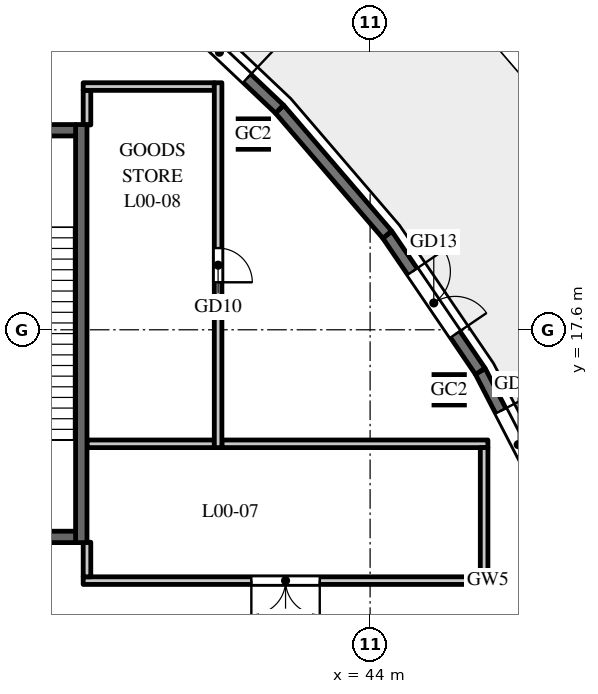
"""IFC4 building model, lengths in metres.
Left out: names, types, materials, properties, quantities, classifications, styles, units other than length and angle.
Written with IfcOpenShell. Run it as: python <this file> out.ifc"""

import sys

from ifc_helpers import new_model, si_unit, direction, frame, frame_2d, origin, origin_2d, place, context, subcontext, project, spatial, rectangle, hollow_rectangle, extrude, element, fill, save


model = new_model("IFC4")
c1 = context("Model", 3, precision=1e-05, world=origin(), true_north=direction((0.0, 1.0)))
c2 = subcontext(c1, "Body", "Model", "MODEL_VIEW")
j1 = project(units=[si_unit("LENGTHUNIT", "METRE"), si_unit("PLANEANGLEUNIT", "RADIAN")], contexts=[c1])
p1 = place(None, origin())
s1 = spatial("IfcSite", under=j1, at=p1, CompositionType="ELEMENT")
p2 = place(p1, origin())
s2 = spatial("IfcBuilding", under=s1, at=p2, CompositionType="ELEMENT")
p3 = place(p2, origin())
s3 = spatial("IfcBuildingStorey", under=s2, at=p3, CompositionType="ELEMENT", Elevation=0.0)
for number, where, z_axis, x_axis in (
    (1, (46.081, 16.021, 0.0), (0.0, 0.0, 1.0), (1.0, 0.0, 0.0)),
    (2, (40.928, 22.75, 0.0), (0.0, 0.0, 1.0), (1.0, 0.0, 0.0)),
):
    element("IfcColumn", number, at=place(p3, frame(where, z_axis=z_axis, x_axis=x_axis)), inside=s3, PredefinedType="COLUMN", context=c2, shape_type="SweptSolid", body=[
        extrude(hollow_rectangle(XDim=0.8, YDim=0.8, WallThickness=0.04, at=origin_2d()), origin(), (0.0, 0.0, 1.0), 7.5),
    ])
p4 = place(p3, frame((36.55, 14.6, 0.0), z_axis=(0.0, 0.0, 1.0), x_axis=(1.0, 0.0, 0.0)))
e3 = element("IfcWall", 3, at=p4, inside=s3, PredefinedType="PARTITIONING", context=c2, shape_type="SweptSolid", body=[
    extrude(rectangle(XDim=3.351, YDim=0.2, at=frame_2d((1.675, 0.0))), origin(), (0.0, 0.0, 1.0), 7.25),
])
p5 = place(p3, frame((47.1, 11.0, 0.0), z_axis=(0.0, 0.0, 1.0), x_axis=(-1.0, 0.0, 0.0)))
e4 = element("IfcWall", 4, at=p5, inside=s3, PredefinedType="PARTITIONING", context=c2, shape_type="SweptSolid", body=[
    extrude(rectangle(XDim=10.65, YDim=0.2, at=frame_2d((5.325, 0.0))), origin(), (0.0, 0.0, 1.0), 7.25),
])
p6 = place(p5, frame((4.425, 0.0, 0.0)))
e5 = element("IfcOpeningElement", 5, at=p6, cuts=e4, PredefinedType="OPENING", context=c2, shape_type="SweptSolid", body=[
    extrude(rectangle(XDim=1.8, YDim=2.4, at=frame_2d((0.9, 1.2))), frame((0.0, 0.11, 0.0), z_axis=(0.0, -1.0, 0.0), x_axis=(1.0, 0.0, 0.0)), (0.0, 0.0, 1.0), 0.22),
])
p7 = place(p3, frame((36.55, 11.1, 0.0), z_axis=(0.0, 0.0, 1.0), x_axis=(0.0, 1.0, 0.0)))
e6 = element("IfcWall", 6, at=p7, inside=s3, PredefinedType="PARTITIONING", context=c2, shape_type="SweptSolid", body=[
    extrude(rectangle(XDim=0.91, YDim=0.2, at=frame_2d((0.455, 0.0))), origin(), (0.0, 0.0, 1.0), 7.25),
])
p8 = place(p3, frame((40.099, 14.6, 0.0), z_axis=(0.0, 0.0, 1.0), x_axis=(1.0, 0.0, 0.0)))
e7 = element("IfcWall", 7, at=p8, inside=s3, PredefinedType="PARTITIONING", context=c2, shape_type="SweptSolid", body=[
    extrude(rectangle(XDim=7.001, YDim=0.2, at=frame_2d((3.5, 0.0))), origin(), (0.0, 0.0, 1.0), 6.65),
])
p9 = place(p3, frame((47.0, 14.5, 0.0), z_axis=(0.0, 0.0, 1.0), x_axis=(0.0, -1.0, 0.0)))
e8 = element("IfcWall", 8, at=p9, inside=s3, PredefinedType="PARTITIONING", context=c2, shape_type="SweptSolid", body=[
    extrude(rectangle(XDim=3.4, YDim=0.2, at=frame_2d((1.7, 0.0))), origin(), (0.0, 0.0, 1.0), 6.65),
])
p10 = place(p3, frame((36.55, 22.99, 0.0), z_axis=(0.0, 0.0, 1.0), x_axis=(0.0, 1.0, 0.0)))
e9 = element("IfcWall", 9, at=p10, inside=s3, PredefinedType="PARTITIONING", context=c2, shape_type="SweptSolid", body=[
    extrude(rectangle(XDim=0.91, YDim=0.2, at=frame_2d((0.455, 0.0))), origin(), (0.0, 0.0, 1.0), 7.25),
])
p11 = place(p3, frame((36.45, 24.0, 0.0), z_axis=(0.0, 0.0, 1.0), x_axis=(1.0, 0.0, 0.0)))
e10 = element("IfcWall", 10, at=p11, inside=s3, PredefinedType="PARTITIONING", context=c2, shape_type="SweptSolid", body=[
    extrude(rectangle(XDim=3.45, YDim=0.2, at=frame_2d((1.725, 0.0))), origin(), (0.0, 0.0, 1.0), 6.65),
])
p12 = place(p3, frame((40.0, 24.1, 0.0), z_axis=(0.0, 0.0, 1.0), x_axis=(0.0, -1.0, 0.0)))
e11 = element("IfcWall", 11, at=p12, inside=s3, PredefinedType="PARTITIONING", context=c2, shape_type="SweptSolid", body=[
    extrude(rectangle(XDim=9.6, YDim=0.2, at=frame_2d((4.8, 0.0))), origin(), (0.0, 0.0, 1.0), 6.65),
])
p13 = place(p12, frame((4.35, 0.0, 0.0)))
e12 = element("IfcOpeningElement", 12, at=p13, cuts=e11, PredefinedType="OPENING", context=c2, shape_type="SweptSolid", body=[
    extrude(rectangle(XDim=0.9, YDim=2.1, at=frame_2d((0.45, 1.05))), frame((0.0, 0.11, 0.0), z_axis=(0.0, -1.0, 0.0), x_axis=(1.0, 0.0, 0.0)), (0.0, 0.0, 1.0), 0.22),
])
p14 = place(p3, frame((48.894, 12.649, 0.0), z_axis=(0.0, 0.0, 1.0), x_axis=(-0.459242531468, 0.888310923771, 0.0)))
e13 = element("IfcWall", 13, at=p14, inside=s3, PredefinedType="SOLIDWALL", context=c2, shape_type="SweptSolid", body=[
    extrude(rectangle(XDim=4.345, YDim=0.3, at=frame_2d((2.172, 0.0))), origin(), (0.0, 0.0, 1.0), 7.25),
])
p15 = place(p14, frame((1.173, 0.0, 0.0)))
e14 = element("IfcOpeningElement", 14, at=p15, cuts=e13, PredefinedType="OPENING", context=c2, shape_type="SweptSolid", body=[
    extrude(rectangle(XDim=2.0, YDim=2.4, at=frame_2d((1.0, 1.2))), frame((0.0, 0.16, 0.0), z_axis=(0.0, -1.0, 0.0), x_axis=(1.0, 0.0, 0.0)), (0.0, 0.0, 1.0), 0.32),
])
p16 = place(p3, frame((46.899, 16.508, 0.0), z_axis=(0.0, 0.0, 1.0), x_axis=(-0.562667738859, 0.82668314102, 0.0)))
e15 = element("IfcWall", 15, at=p16, inside=s3, PredefinedType="SOLIDWALL", context=c2, shape_type="SweptSolid", body=[
    extrude(rectangle(XDim=4.349, YDim=0.3, at=frame_2d((2.174, 0.0))), origin(), (0.0, 0.0, 1.0), 7.25),
])
p17 = place(p16, frame((1.174, 0.0, 0.0)))
e16 = element("IfcOpeningElement", 16, at=p17, cuts=e15, PredefinedType="OPENING", context=c2, shape_type="SweptSolid", body=[
    extrude(rectangle(XDim=2.0, YDim=2.4, at=frame_2d((1.0, 1.2))), frame((0.0, 0.16, 0.0), z_axis=(0.0, -1.0, 0.0), x_axis=(1.0, 0.0, 0.0)), (0.0, 0.0, 1.0), 0.32),
])
p18 = place(p3, frame((44.452, 20.104, 0.0), z_axis=(0.0, 0.0, 1.0), x_axis=(-0.651387059497, 0.758745608699, 0.0)))
e17 = element("IfcWall", 17, at=p18, inside=s3, PredefinedType="SOLIDWALL", context=c2, shape_type="SweptSolid", body=[
    extrude(rectangle(XDim=4.353, YDim=0.3, at=frame_2d((2.176, 0.0))), origin(), (0.0, 0.0, 1.0), 7.25),
])
p19 = place(p18, frame((0.676, 0.0, 0.0)))
e18 = element("IfcOpeningElement", 18, at=p19, cuts=e17, PredefinedType="OPENING", context=c2, shape_type="SweptSolid", body=[
    extrude(rectangle(XDim=3.0, YDim=3.6, at=frame_2d((1.5, 1.8))), frame((0.0, 0.16, 0.0), z_axis=(0.0, -1.0, 0.0), x_axis=(1.0, 0.0, 0.0)), (0.0, 0.0, 1.0), 0.32),
])
p20 = place(p3, frame((41.617, 23.406, 0.0), z_axis=(0.0, 0.0, 1.0), x_axis=(-0.72620446032, 0.687478786444, 0.0)))
e19 = element("IfcWall", 19, at=p20, inside=s3, PredefinedType="SOLIDWALL", context=c2, shape_type="SweptSolid", body=[
    extrude(rectangle(XDim=4.356, YDim=0.3, at=frame_2d((2.178, 0.0))), origin(), (0.0, 0.0, 1.0), 7.25),
])
p21 = place(p20, frame((1.178, 0.0, 0.0)))
e20 = element("IfcOpeningElement", 20, at=p21, cuts=e19, PredefinedType="OPENING", context=c2, shape_type="SweptSolid", body=[
    extrude(rectangle(XDim=2.0, YDim=2.4, at=frame_2d((1.0, 1.2))), frame((0.0, 0.16, 0.0), z_axis=(0.0, -1.0, 0.0), x_axis=(1.0, 0.0, 0.0)), (0.0, 0.0, 1.0), 0.32),
])
p22 = place(p3, frame((36.4, 12.0, 0.0), z_axis=(0.0, 0.0, 1.0), x_axis=(0.0, 1.0, 0.0)))
e21 = element("IfcWall", 21, at=p22, inside=s3, PredefinedType="SHEAR", context=c2, shape_type="SweptSolid", body=[
    extrude(rectangle(XDim=11.0, YDim=0.3, at=frame_2d((5.5, 0.0))), origin(), (0.0, 0.0, 1.0), 7.25),
])
p23 = place(p3, frame((31.3, 12.15, 0.0), z_axis=(0.0, 0.0, 1.0), x_axis=(1.0, 0.0, 0.0)))
e22 = element("IfcWall", 22, at=p23, inside=s3, PredefinedType="SHEAR", context=c2, shape_type="SweptSolid", body=[
    extrude(rectangle(XDim=4.95, YDim=0.3, at=frame_2d((2.475, 0.0))), origin(), (0.0, 0.0, 1.0), 7.25),
])
p24 = place(p3, frame((31.3, 22.85, 0.0), z_axis=(0.0, 0.0, 1.0), x_axis=(1.0, 0.0, 0.0)))
e23 = element("IfcWall", 23, at=p24, inside=s3, PredefinedType="SHEAR", context=c2, shape_type="SweptSolid", body=[
    extrude(rectangle(XDim=4.95, YDim=0.3, at=frame_2d((2.475, 0.0))), origin(), (0.0, 0.0, 1.0), 7.25),
])
p25 = place(p24, frame((1.475, 0.0, 0.0)))
e24 = element("IfcOpeningElement", 24, at=p25, cuts=e23, PredefinedType="OPENING", context=c2, shape_type="SweptSolid", body=[
    extrude(rectangle(XDim=2.0, YDim=2.1, at=frame_2d((1.0, 1.05))), frame((0.0, 0.16, 0.0), z_axis=(0.0, -1.0, 0.0), x_axis=(1.0, 0.0, 0.0)), (0.0, 0.0, 1.0), 0.32),
])
p26 = place(p6, origin())
e25 = element("IfcDoor", 25, at=p26, inside=s3, OperationType="DOUBLE_DOOR_SINGLE_SWING", PredefinedType="DOOR", context=c2, shape_type="SweptSolid", body=[
    extrude(rectangle(XDim=1.8, YDim=2.4, at=frame_2d((0.9, 1.2))), frame((0.0, 0.025, 0.0), z_axis=(0.0, -1.0, 0.0), x_axis=(1.0, 0.0, 0.0)), (0.0, 0.0, 1.0), 0.05),
])
fill(e5, e25)
p27 = place(p13, origin())
e26 = element("IfcDoor", 26, at=p27, inside=s3, OperationType="SINGLE_SWING_RIGHT", PredefinedType="DOOR", context=c2, shape_type="SweptSolid", body=[
    extrude(rectangle(XDim=0.9, YDim=2.1, at=frame_2d((0.45, 1.05))), frame((0.0, 0.025, 0.0), z_axis=(0.0, -1.0, 0.0), x_axis=(1.0, 0.0, 0.0)), (0.0, 0.0, 1.0), 0.05),
])
fill(e12, e26)
p28 = place(p15, frame((2.0, 0.0, 0.0), z_axis=(0.0, 0.0, 1.0), x_axis=(-1.0, 0.0, 0.0)))
e27 = element("IfcDoor", 27, at=p28, inside=s3, OperationType="DOUBLE_DOOR_SINGLE_SWING", PredefinedType="DOOR", context=c2, shape_type="SweptSolid", body=[
    extrude(rectangle(XDim=2.0, YDim=2.4, at=frame_2d((1.0, 1.2))), frame((0.0, 0.025, 0.0), z_axis=(0.0, -1.0, 0.0), x_axis=(1.0, 0.0, 0.0)), (0.0, 0.0, 1.0), 0.05),
])
fill(e14, e27)
p29 = place(p17, frame((2.0, 0.0, 0.0), z_axis=(0.0, 0.0, 1.0), x_axis=(-1.0, 0.0, 0.0)))
e28 = element("IfcDoor", 28, at=p29, inside=s3, OperationType="DOUBLE_DOOR_SINGLE_SWING", PredefinedType="DOOR", context=c2, shape_type="SweptSolid", body=[
    extrude(rectangle(XDim=2.0, YDim=2.4, at=frame_2d((1.0, 1.2))), frame((0.0, 0.025, 0.0), z_axis=(0.0, -1.0, 0.0), x_axis=(1.0, 0.0, 0.0)), (0.0, 0.0, 1.0), 0.05),
])
fill(e16, e28)
p30 = place(p19, origin())
e29 = element("IfcWindow", 29, at=p30, inside=s3, PartitioningType="SINGLE_PANEL", PredefinedType="WINDOW", context=c2, shape_type="SweptSolid", body=[
    extrude(rectangle(XDim=3.0, YDim=3.6, at=frame_2d((1.5, 1.8))), frame((0.0, 0.03, 0.0), z_axis=(0.0, -1.0, 0.0), x_axis=(1.0, 0.0, 0.0)), (0.0, 0.0, 1.0), 0.06),
])
fill(e18, e29)
p31 = place(p21, frame((2.0, 0.0, 0.0), z_axis=(0.0, 0.0, 1.0), x_axis=(-1.0, 0.0, 0.0)))
e30 = element("IfcDoor", 30, at=p31, inside=s3, OperationType="DOUBLE_DOOR_SINGLE_SWING", PredefinedType="DOOR", context=c2, shape_type="SweptSolid", body=[
    extrude(rectangle(XDim=2.0, YDim=2.4, at=frame_2d((1.0, 1.2))), frame((0.0, 0.025, 0.0), z_axis=(0.0, -1.0, 0.0), x_axis=(1.0, 0.0, 0.0)), (0.0, 0.0, 1.0), 0.05),
])
fill(e20, e30)
save(model, sys.argv[1])
